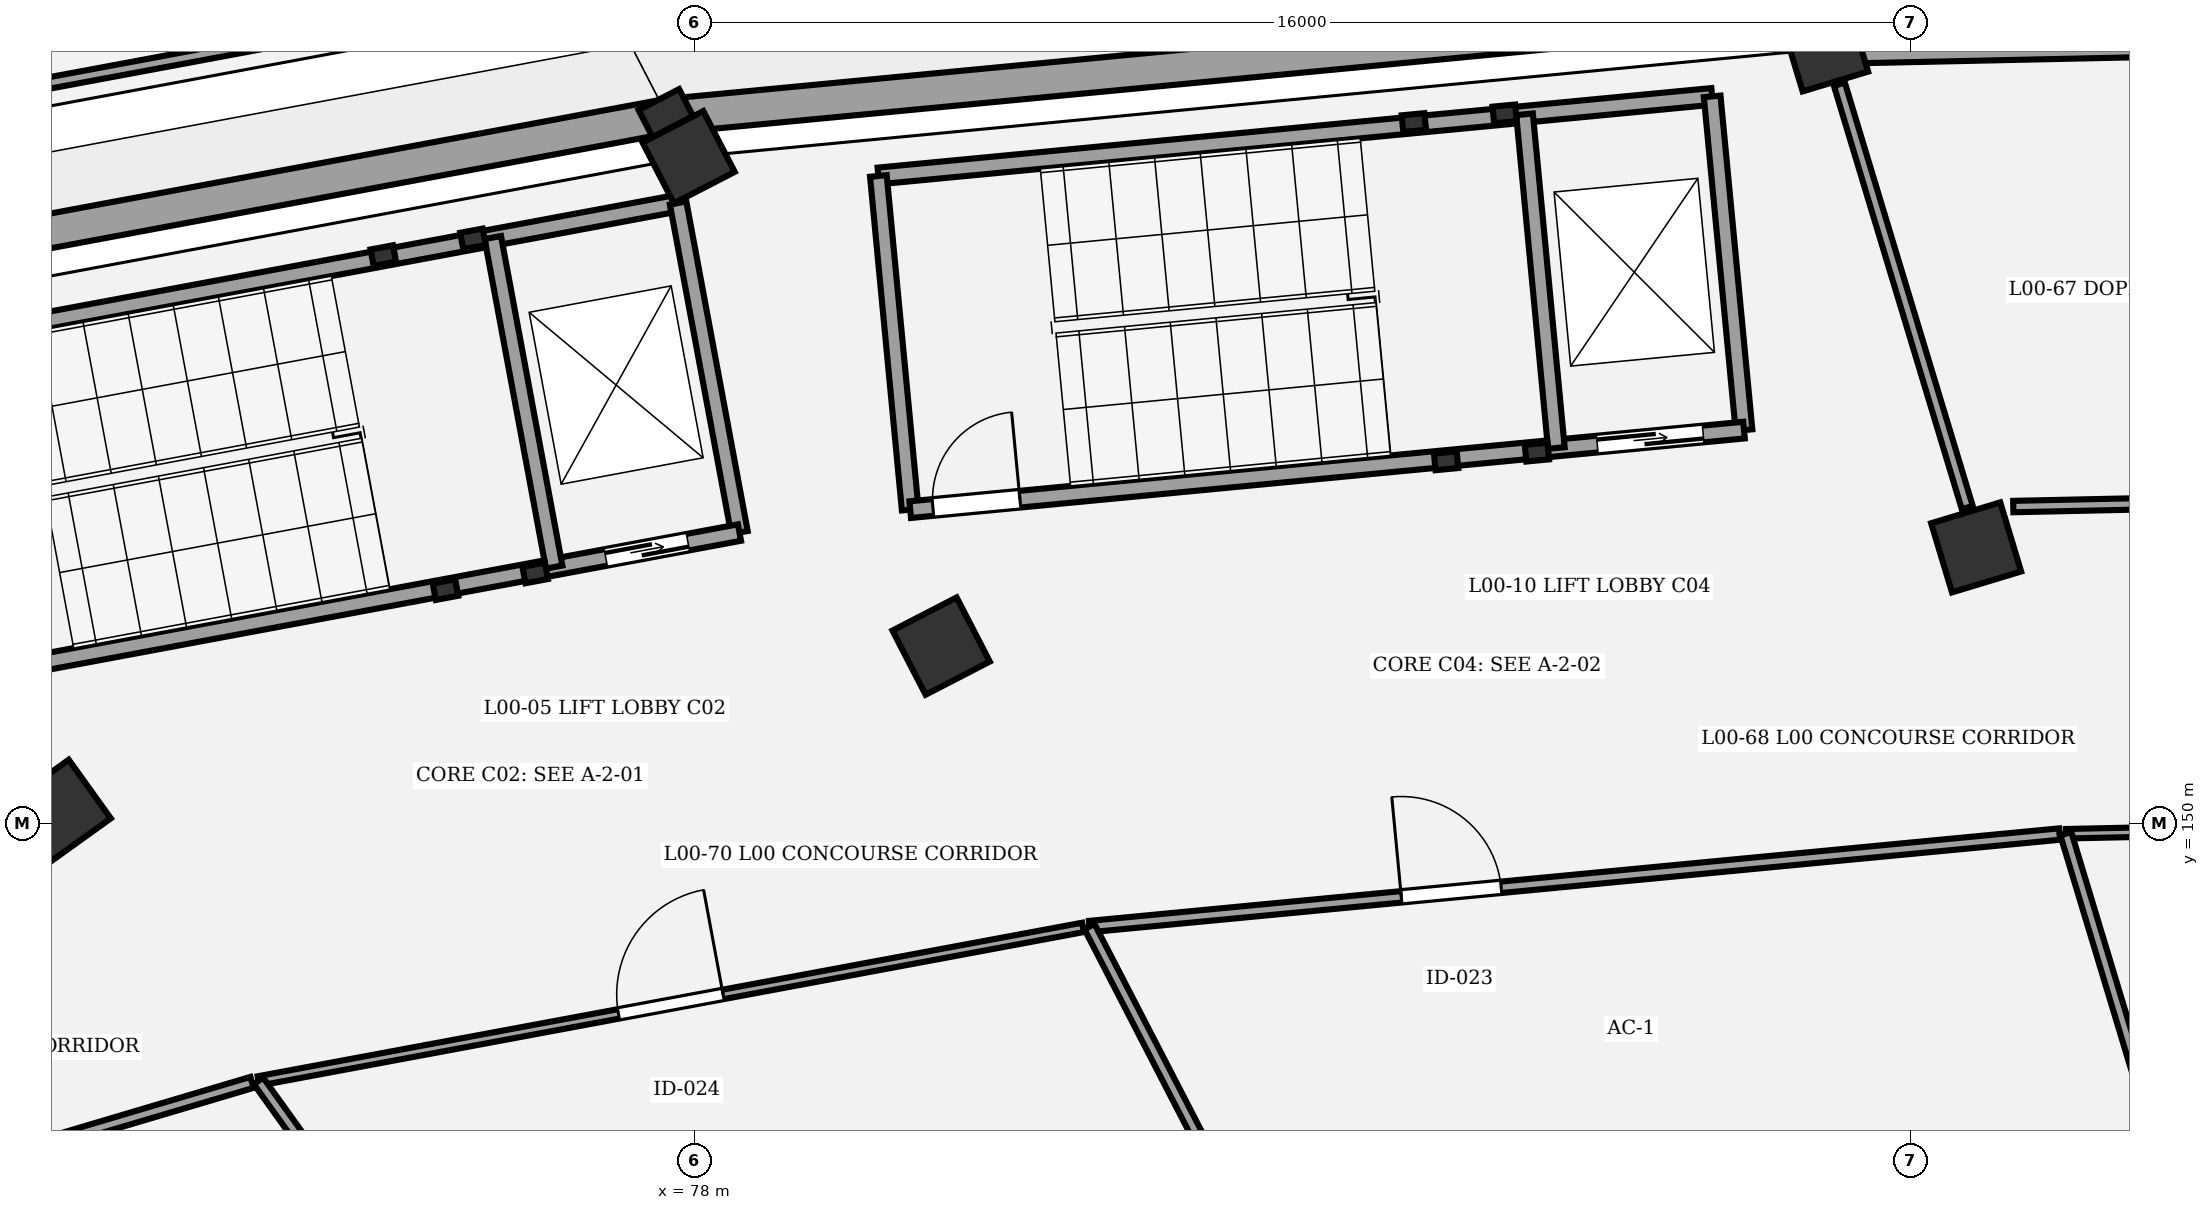
"""IFC4 building model, lengths in metres.
Left out: names, types, materials, properties, quantities, classifications, styles, units other than length and angle.
Written with IfcOpenShell. Run it as: python <this file> out.ifc"""

import sys

from ifc_helpers import new_model, si_unit, direction, frame, frame_2d, origin, origin_2d, place, context, subcontext, project, spatial, rectangle, extrude, element, fill, save


model = new_model("IFC4")
c1 = context("Model", 3, precision=1e-05, world=origin(), true_north=direction((0.0, 1.0)))
c2 = subcontext(c1, "Body", "Model", "MODEL_VIEW")
j1 = project(units=[si_unit("LENGTHUNIT", "METRE"), si_unit("PLANEANGLEUNIT", "RADIAN")], contexts=[c1])
p1 = place(None, origin())
s1 = spatial("IfcSite", under=j1, at=p1, CompositionType="ELEMENT")
p2 = place(p1, origin())
s2 = spatial("IfcBuilding", under=s1, at=p2, CompositionType="ELEMENT")
p3 = place(p2, origin())
s3 = spatial("IfcBuildingStorey", under=s2, at=p3, CompositionType="ELEMENT", Elevation=0.0)
p4 = place(p3, frame((94.867, 153.634, 0.0), z_axis=(0.0, 0.0, 1.0), x_axis=(-0.289198876314, 0.957269037387, 0.0)))
e1 = element("IfcColumn", 1, at=p4, inside=s3, PredefinedType="COLUMN", context=c2, shape_type="SweptSolid", body=[
    extrude(rectangle(XDim=0.95, YDim=0.95, at=origin_2d()), origin(), (0.0, 0.0, 1.0), 5.4),
])
p5 = place(p3, frame((92.885, 160.194, 0.0), z_axis=(0.0, 0.0, 1.0), x_axis=(-0.289198876314, 0.957269037387, 0.0)))
e2 = element("IfcColumn", 2, at=p5, inside=s3, PredefinedType="COLUMN", context=c2, shape_type="SweptSolid", body=[
    extrude(rectangle(XDim=0.9, YDim=0.9, at=origin_2d()), origin(), (0.0, 0.0, 1.0), 5.4),
])
p6 = place(p3, frame((81.25, 152.335, 0.0), z_axis=(0.0, 0.0, 1.0), x_axis=(-0.458959712465, 0.888457079624, 0.0)))
e3 = element("IfcColumn", 3, at=p6, inside=s3, PredefinedType="COLUMN", context=c2, shape_type="SweptSolid", body=[
    extrude(rectangle(XDim=0.95, YDim=0.95, at=origin_2d()), origin(), (0.0, 0.0, 1.0), 5.4),
])
p7 = place(p3, frame((77.927, 158.767, 0.0), z_axis=(0.0, 0.0, 1.0), x_axis=(-0.458959712465, 0.888457079624, 0.0)))
e4 = element("IfcColumn", 4, at=p7, inside=s3, PredefinedType="COLUMN", context=c2, shape_type="SweptSolid", body=[
    extrude(rectangle(XDim=0.9, YDim=0.9, at=origin_2d()), origin(), (0.0, 0.0, 1.0), 5.4),
])
p8 = place(p3, frame((77.627, 159.348, 0.0), z_axis=(0.0, 0.0, 1.0), x_axis=(-0.888457079624, -0.458959712465, 0.0)))
e5 = element("IfcColumn", 5, at=p8, inside=s3, PredefinedType="PILASTER", context=c2, shape_type="SweptSolid", body=[
    extrude(rectangle(XDim=0.6, YDim=0.4, at=origin_2d()), origin(), (0.0, 0.0, 1.0), 5.4),
])
p9 = place(p3, frame((69.662, 150.177, 0.0), z_axis=(0.0, 0.0, 1.0), x_axis=(-0.582974127943, 0.812490717577, 0.0)))
e6 = element("IfcColumn", 6, at=p9, inside=s3, PredefinedType="COLUMN", context=c2, shape_type="SweptSolid", body=[
    extrude(rectangle(XDim=0.95, YDim=0.95, at=origin_2d()), origin(), (0.0, 0.0, 1.0), 5.4),
])
p10 = place(p3, frame((92.719, 160.746, 0.0), z_axis=(0.0, 0.0, 1.0), x_axis=(-0.995485029846, -0.09491867758, 0.0)))
e7 = element("IfcWall", 7, at=p10, inside=s3, PredefinedType="USERDEFINED", context=c2, shape_type="SweptSolid", body=[
    extrude(rectangle(XDim=15.139, YDim=0.45, at=frame_2d((7.57, 0.0))), origin(), (0.0, 0.0, 1.0), 4.25),
])
p11 = place(p3, frame((77.647, 159.309, 0.0), z_axis=(0.0, 0.0, 1.0), x_axis=(-0.983095830164, -0.183091749443, 0.0)))
e8 = element("IfcWall", 8, at=p11, inside=s3, PredefinedType="USERDEFINED", context=c2, shape_type="SweptSolid", body=[
    extrude(rectangle(XDim=13.045, YDim=0.45, at=frame_2d((6.522, 0.0))), origin(), (0.0, 0.0, 1.0), 4.25),
])
p12 = place(p3, frame((93.333, 160.203, 0.0), z_axis=(0.0, 0.0, 1.0), x_axis=(0.999768115817, 0.021534033422, 0.0)))
e9 = element("IfcWall", 9, at=p12, inside=s3, PredefinedType="STANDARD", context=c2, shape_type="SweptSolid", body=[
    extrude(rectangle(XDim=21.224, YDim=0.4, at=frame_2d((10.612, 0.0))), origin(), (0.0, 0.0, 1.0), 4.25),
])
p13 = place(p12, frame((8.862, 0.0, 0.0)))
e10 = element("IfcOpeningElement", 10, at=p13, cuts=e9, PredefinedType="OPENING", context=c2, shape_type="SweptSolid", body=[
    extrude(rectangle(XDim=3.5, YDim=3.2, at=frame_2d((1.75, 1.6))), frame((0.0, 0.21, 0.0), z_axis=(0.0, -1.0, 0.0), x_axis=(1.0, 0.0, 0.0)), (0.0, 0.0, 1.0), 0.42),
])
for number, where, z_axis, x_axis in (
    (11, (74.729, 153.078, 0.0), (0.0, 0.0, 1.0), (0.983, 0.183, 0.0)),
    (12, (75.908, 153.298, 0.0), (0.0, 0.0, 1.0), (0.983, 0.183, 0.0)),
    (13, (75.09, 157.692, 0.0), (0.0, 0.0, 1.0), (0.983, 0.183, 0.0)),
    (14, (73.91, 157.473, 0.0), (0.0, 0.0, 1.0), (0.983, 0.183, 0.0)),
):
    element("IfcColumn", number, at=place(p3, frame(where, z_axis=z_axis, x_axis=x_axis)), inside=s3, PredefinedType="COLUMN", context=c2, shape_type="SweptSolid", body=[
        extrude(rectangle(XDim=0.3, YDim=0.22, at=origin_2d()), origin(), (0.0, 0.0, 1.0), 5.4),
    ])
p14 = place(p3, frame((66.955, 156.147, 0.0), z_axis=(0.0, 0.0, 1.0), x_axis=(0.983093434234, 0.183104613723, 0.0)))
e15 = element("IfcWall", 15, at=p14, inside=s3, PredefinedType="SHEAR", context=c2, shape_type="SweptSolid", body=[
    extrude(rectangle(XDim=11.02, YDim=0.22, at=frame_2d((5.51, 0.0))), origin(), (0.0, 0.0, 1.0), 5.15),
])
p15 = place(p3, frame((78.596, 153.829, 0.0), z_axis=(0.0, 0.0, 1.0), x_axis=(-0.183078394814, 0.983098317236, 0.0)))
e16 = element("IfcWall", 16, at=p15, inside=s3, PredefinedType="SHEAR", context=c2, shape_type="SweptSolid", body=[
    extrude(rectangle(XDim=4.41, YDim=0.22, at=frame_2d((2.205, 0.0))), origin(), (0.0, 0.0, 1.0), 5.15),
])
p16 = place(p3, frame((67.763, 151.811, 0.0), z_axis=(0.0, 0.0, 1.0), x_axis=(0.983093434234, 0.183104613723, 0.0)))
e17 = element("IfcWall", 17, at=p16, inside=s3, PredefinedType="SHEAR", context=c2, shape_type="SweptSolid", body=[
    extrude(rectangle(XDim=11.02, YDim=0.22, at=frame_2d((5.51, 0.0))), origin(), (0.0, 0.0, 1.0), 5.15),
])
p17 = place(p16, frame((0.3, 0.0, 0.0)))
e18 = element("IfcOpeningElement", 18, at=p17, cuts=e17, PredefinedType="OPENING", context=c2, shape_type="SweptSolid", body=[
    extrude(rectangle(XDim=1.15, YDim=2.15, at=frame_2d((0.575, 1.075))), frame((0.0, 0.12, 0.0), z_axis=(0.0, -1.0, 0.0), x_axis=(1.0, 0.0, 0.0)), (0.0, 0.0, 1.0), 0.24),
])
p18 = place(p16, frame((9.23, 0.0, 0.0)))
e19 = element("IfcOpeningElement", 19, at=p18, cuts=e17, PredefinedType="OPENING", context=c2, shape_type="SweptSolid", body=[
    extrude(rectangle(XDim=1.1, YDim=2.15, at=frame_2d((0.55, 1.075))), frame((0.0, 0.12, 0.0), z_axis=(0.0, -1.0, 0.0), x_axis=(1.0, 0.0, 0.0)), (0.0, 0.0, 1.0), 0.24),
])
p19 = place(p3, frame((76.158, 153.375, 0.0), z_axis=(0.0, 0.0, 1.0), x_axis=(-0.183078394814, 0.983098317236, 0.0)))
e20 = element("IfcWall", 20, at=p19, inside=s3, PredefinedType="SHEAR", context=c2, shape_type="SweptSolid", body=[
    extrude(rectangle(XDim=4.41, YDim=0.22, at=frame_2d((2.205, 0.0))), origin(), (0.0, 0.0, 1.0), 5.15),
])
for number, where, z_axis, x_axis in (
    (21, (87.894, 154.773, 0.0), (0.0, 0.0, 1.0), (0.995, 0.095, 0.0)),
    (22, (89.088, 154.887, 0.0), (0.0, 0.0, 1.0), (0.995, 0.095, 0.0)),
    (23, (88.664, 159.337, 0.0), (0.0, 0.0, 1.0), (0.995, 0.095, 0.0)),
    (24, (87.469, 159.223, 0.0), (0.0, 0.0, 1.0), (0.995, 0.095, 0.0)),
):
    element("IfcColumn", number, at=place(p3, frame(where, z_axis=z_axis, x_axis=x_axis)), inside=s3, PredefinedType="COLUMN", context=c2, shape_type="SweptSolid", body=[
        extrude(rectangle(XDim=0.3, YDim=0.22, at=origin_2d()), origin(), (0.0, 0.0, 1.0), 5.4),
    ])
p20 = place(p3, frame((80.424, 158.521, 0.0), z_axis=(0.0, 0.0, 1.0), x_axis=(0.99547962713, 0.094975322952, 0.0)))
e25 = element("IfcWall", 25, at=p20, inside=s3, PredefinedType="SHEAR", context=c2, shape_type="SweptSolid", body=[
    extrude(rectangle(XDim=11.02, YDim=0.22, at=frame_2d((5.51, 0.0))), origin(), (0.0, 0.0, 1.0), 5.15),
])
for number, where, z_axis, x_axis in (
    (26, (80.843, 154.13, 0.0), (0.0, 0.0, 1.0), (-0.095, 0.995, 0.0)),
    (27, (91.813, 155.177, 0.0), (0.0, 0.0, 1.0), (-0.095, 0.995, 0.0)),
):
    element("IfcWall", number, at=place(p3, frame(where, z_axis=z_axis, x_axis=x_axis)), inside=s3, PredefinedType="SHEAR", context=c2, shape_type="SweptSolid", body=[
        extrude(rectangle(XDim=4.41, YDim=0.22, at=frame_2d((2.205, 0.0))), origin(), (0.0, 0.0, 1.0), 5.15),
    ])
p21 = place(p3, frame((80.843, 154.13, 0.0), z_axis=(0.0, 0.0, 1.0), x_axis=(0.995479427285, 0.094977417594, 0.0)))
e28 = element("IfcWall", 28, at=p21, inside=s3, PredefinedType="SHEAR", context=c2, shape_type="SweptSolid", body=[
    extrude(rectangle(XDim=11.02, YDim=0.22, at=frame_2d((5.51, 0.0))), origin(), (0.0, 0.0, 1.0), 5.15),
])
p22 = place(p21, frame((0.3, 0.0, 0.0)))
e29 = element("IfcOpeningElement", 29, at=p22, cuts=e28, PredefinedType="OPENING", context=c2, shape_type="SweptSolid", body=[
    extrude(rectangle(XDim=1.15, YDim=2.15, at=frame_2d((0.575, 1.075))), frame((0.0, 0.12, 0.0), z_axis=(0.0, -1.0, 0.0), x_axis=(1.0, 0.0, 0.0)), (0.0, 0.0, 1.0), 0.24),
])
p23 = place(p21, frame((9.08, 0.0, 0.0)))
e30 = element("IfcOpeningElement", 30, at=p23, cuts=e28, PredefinedType="OPENING", context=c2, shape_type="SweptSolid", body=[
    extrude(rectangle(XDim=1.4, YDim=2.25, at=frame_2d((0.7, 1.125))), frame((0.0, 0.12, 0.0), z_axis=(0.0, -1.0, 0.0), x_axis=(1.0, 0.0, 0.0)), (0.0, 0.0, 1.0), 0.24),
])
p24 = place(p3, frame((89.344, 154.941, 0.0), z_axis=(0.0, 0.0, 1.0), x_axis=(-0.094942328893, 0.995482774429, 0.0)))
e31 = element("IfcWall", 31, at=p24, inside=s3, PredefinedType="SHEAR", context=c2, shape_type="SweptSolid", body=[
    extrude(rectangle(XDim=4.41, YDim=0.22, at=frame_2d((2.205, 0.0))), origin(), (0.0, 0.0, 1.0), 5.15),
])
p25 = place(p3, frame((96.047, 149.866, 0.0), z_axis=(0.0, 0.0, 1.0), x_axis=(0.999768266483, 0.021527037261, 0.0)))
e32 = element("IfcWall", 32, at=p25, inside=s3, PredefinedType="PARTITIONING", context=c2, shape_type="SweptSolid", body=[
    extrude(rectangle(XDim=18.917, YDim=0.125, at=frame_2d((9.458, 0.0))), origin(), (0.0, 0.0, 1.0), 4.15),
])
p26 = place(p25, frame((8.848, 0.0, 0.0)))
e33 = element("IfcOpeningElement", 33, at=p26, cuts=e32, PredefinedType="OPENING", context=c2, shape_type="SweptSolid", body=[
    extrude(rectangle(XDim=1.22, YDim=2.2, at=frame_2d((0.61, 1.1))), frame((0.0, 0.073, 0.0), z_axis=(0.0, -1.0, 0.0), x_axis=(1.0, 0.0, 0.0)), (0.0, 0.0, 1.0), 0.145),
])
p27 = place(p3, frame((114.489, 154.583, 0.0), z_axis=(0.0, 0.0, 1.0), x_axis=(-0.999768107727, -0.021534409017, 0.0)))
e34 = element("IfcWall", 34, at=p27, inside=s3, PredefinedType="PARTITIONING", context=c2, shape_type="SweptSolid", body=[
    extrude(rectangle(XDim=19.137, YDim=0.15, at=frame_2d((9.569, 0.0))), origin(), (0.0, 0.0, 1.0), 4.15),
])
p28 = place(p27, frame((8.939, 0.0, 0.0)))
e35 = element("IfcOpeningElement", 35, at=p28, cuts=e34, PredefinedType="OPENING", context=c2, shape_type="SweptSolid", body=[
    extrude(rectangle(XDim=1.26, YDim=2.2, at=frame_2d((0.63, 1.1))), frame((0.0, 0.085, 0.0), z_axis=(0.0, -1.0, 0.0), x_axis=(1.0, 0.0, 0.0)), (0.0, 0.0, 1.0), 0.17),
])
p29 = place(p3, frame((83.201, 148.645, 0.0), z_axis=(0.0, 0.0, 1.0), x_axis=(0.995485111947, 0.094917816515, 0.0)))
e36 = element("IfcWall", 36, at=p29, inside=s3, PredefinedType="PARTITIONING", context=c2, shape_type="SweptSolid", body=[
    extrude(rectangle(XDim=12.822, YDim=0.15, at=frame_2d((6.411, 0.0))), origin(), (0.0, 0.0, 1.0), 4.15),
])
p30 = place(p29, frame((4.122, 0.0, 0.0)))
e37 = element("IfcOpeningElement", 37, at=p30, cuts=e36, PredefinedType="OPENING", context=c2, shape_type="SweptSolid", body=[
    extrude(rectangle(XDim=1.32, YDim=2.2, at=frame_2d((0.66, 1.1))), frame((0.0, 0.085, 0.0), z_axis=(0.0, -1.0, 0.0), x_axis=(1.0, 0.0, 0.0)), (0.0, 0.0, 1.0), 0.17),
])
p31 = place(p3, frame((72.268, 146.614, 0.0), z_axis=(0.0, 0.0, 1.0), x_axis=(0.983097372707, 0.183083466695, 0.0)))
e38 = element("IfcWall", 38, at=p31, inside=s3, PredefinedType="PARTITIONING", context=c2, shape_type="SweptSolid", body=[
    extrude(rectangle(XDim=11.035, YDim=0.125, at=frame_2d((5.517, 0.0))), origin(), (0.0, 0.0, 1.0), 4.15),
])
p32 = place(p31, frame((4.817, 0.0, 0.0)))
e39 = element("IfcOpeningElement", 39, at=p32, cuts=e38, PredefinedType="OPENING", context=c2, shape_type="SweptSolid", body=[
    extrude(rectangle(XDim=1.4, YDim=2.2, at=frame_2d((0.7, 1.1))), frame((0.0, 0.073, 0.0), z_axis=(0.0, -1.0, 0.0), x_axis=(1.0, 0.0, 0.0)), (0.0, 0.0, 1.0), 0.145),
])
p33 = place(p3, frame((62.701, 143.781, 0.0), z_axis=(0.0, 0.0, 1.0), x_axis=(0.958655809656, 0.284568161629, 0.0)))
e40 = element("IfcWall", 40, at=p33, inside=s3, PredefinedType="PARTITIONING", context=c2, shape_type="SweptSolid", body=[
    extrude(rectangle(XDim=9.891, YDim=0.15, at=frame_2d((4.946, 0.0))), origin(), (0.0, 0.0, 1.0), 4.15),
])
p34 = place(p33, frame((3.243, 0.0, 0.0)))
e41 = element("IfcOpeningElement", 41, at=p34, cuts=e40, PredefinedType="OPENING", context=c2, shape_type="SweptSolid", body=[
    extrude(rectangle(XDim=0.9, YDim=2.3, at=frame_2d((0.45, 1.15))), frame((0.0, 0.085, 0.0), z_axis=(0.0, -1.0, 0.0), x_axis=(1.0, 0.0, 0.0)), (0.0, 0.0, 1.0), 0.17),
])
p35 = place(p3, frame((99.487, 138.483, 0.0), z_axis=(0.0, 0.0, 1.0), x_axis=(-0.289240317571, 0.957256516662, 0.0)))
e42 = element("IfcWall", 42, at=p35, inside=s3, PredefinedType="PARTITIONING", context=c2, shape_type="SweptSolid", body=[
    extrude(rectangle(XDim=11.891, YDim=0.15, at=frame_2d((5.946, 0.0))), origin(), (0.0, 0.0, 1.0), 4.15),
])
p36 = place(p3, frame((94.751, 154.158, 0.0), z_axis=(0.0, 0.0, 1.0), x_axis=(-0.289195444178, 0.957270074256, 0.0)))
e43 = element("IfcWall", 43, at=p36, inside=s3, PredefinedType="PARTITIONING", context=c2, shape_type="SweptSolid", body=[
    extrude(rectangle(XDim=5.817, YDim=0.15, at=frame_2d((2.909, 0.0))), origin(), (0.0, 0.0, 1.0), 4.15),
])
p37 = place(p3, frame((88.967, 137.483, 0.0), z_axis=(0.0, 0.0, 1.0), x_axis=(-0.458958189589, 0.888457866311, 0.0)))
e44 = element("IfcWall", 44, at=p37, inside=s3, PredefinedType="PARTITIONING", context=c2, shape_type="SweptSolid", body=[
    extrude(rectangle(XDim=12.564, YDim=0.15, at=frame_2d((6.282, 0.0))), origin(), (0.0, 0.0, 1.0), 4.15),
])
p38 = place(p3, frame((80.016, 135.818, 0.0), z_axis=(0.0, 0.0, 1.0), x_axis=(-0.583032067708, 0.812449141808, 0.0)))
e45 = element("IfcWall", 45, at=p38, inside=s3, PredefinedType="PARTITIONING", context=c2, shape_type="SweptSolid", body=[
    extrude(rectangle(XDim=13.288, YDim=0.15, at=frame_2d((6.644, 0.0))), origin(), (0.0, 0.0, 1.0), 4.15),
])
p39 = place(p3, frame((77.469, 161.225, 0.0), z_axis=(0.0, 0.0, 1.0), x_axis=(-0.983094545276, -0.183098648406, 0.0)))
e46 = element("IfcWall", 46, at=p39, inside=s3, PredefinedType="PARTITIONING", context=c2, shape_type="SweptSolid", body=[
    extrude(rectangle(XDim=12.947, YDim=0.15, at=frame_2d((6.474, 0.0))), origin(), (0.0, 0.0, 1.0), 4.15),
])
p40 = place(p18, origin())
e47 = element("IfcDoor", 47, at=p40, inside=s3, OperationType="DOUBLE_DOOR_SLIDING", PredefinedType="DOOR", context=c2, shape_type="SweptSolid", body=[
    extrude(rectangle(XDim=1.1, YDim=2.15, at=frame_2d((0.55, 1.075))), frame((0.0, 0.025, 0.0), z_axis=(0.0, -1.0, 0.0), x_axis=(1.0, 0.0, 0.0)), (0.0, 0.0, 1.0), 0.05),
])
fill(e19, e47)
p41 = place(p22, origin())
e48 = element("IfcDoor", 48, at=p41, inside=s3, OperationType="SINGLE_SWING_RIGHT", PredefinedType="DOOR", context=c2, shape_type="SweptSolid", body=[
    extrude(rectangle(XDim=1.15, YDim=2.15, at=frame_2d((0.575, 1.075))), frame((0.0, 0.025, 0.0), z_axis=(0.0, -1.0, 0.0), x_axis=(1.0, 0.0, 0.0)), (0.0, 0.0, 1.0), 0.05),
])
fill(e29, e48)
p42 = place(p23, origin())
e49 = element("IfcDoor", 49, at=p42, inside=s3, OperationType="DOUBLE_DOOR_SLIDING", PredefinedType="DOOR", context=c2, shape_type="SweptSolid", body=[
    extrude(rectangle(XDim=1.4, YDim=2.25, at=frame_2d((0.7, 1.125))), frame((0.0, 0.025, 0.0), z_axis=(0.0, -1.0, 0.0), x_axis=(1.0, 0.0, 0.0)), (0.0, 0.0, 1.0), 0.05),
])
fill(e30, e49)
p43 = place(p30, origin())
e50 = element("IfcDoor", 50, at=p43, inside=s3, OperationType="SINGLE_SWING_LEFT", PredefinedType="DOOR", context=c2, shape_type="SweptSolid", body=[
    extrude(rectangle(XDim=1.32, YDim=2.2, at=frame_2d((0.66, 1.1))), frame((0.0, 0.025, 0.0), z_axis=(0.0, -1.0, 0.0), x_axis=(1.0, 0.0, 0.0)), (0.0, 0.0, 1.0), 0.05),
])
fill(e37, e50)
p44 = place(p32, origin())
e51 = element("IfcDoor", 51, at=p44, inside=s3, OperationType="SINGLE_SWING_RIGHT", PredefinedType="DOOR", context=c2, shape_type="SweptSolid", body=[
    extrude(rectangle(XDim=1.4, YDim=2.2, at=frame_2d((0.7, 1.1))), frame((0.0, 0.025, 0.0), z_axis=(0.0, -1.0, 0.0), x_axis=(1.0, 0.0, 0.0)), (0.0, 0.0, 1.0), 0.05),
])
fill(e39, e51)
save(model, sys.argv[1])
